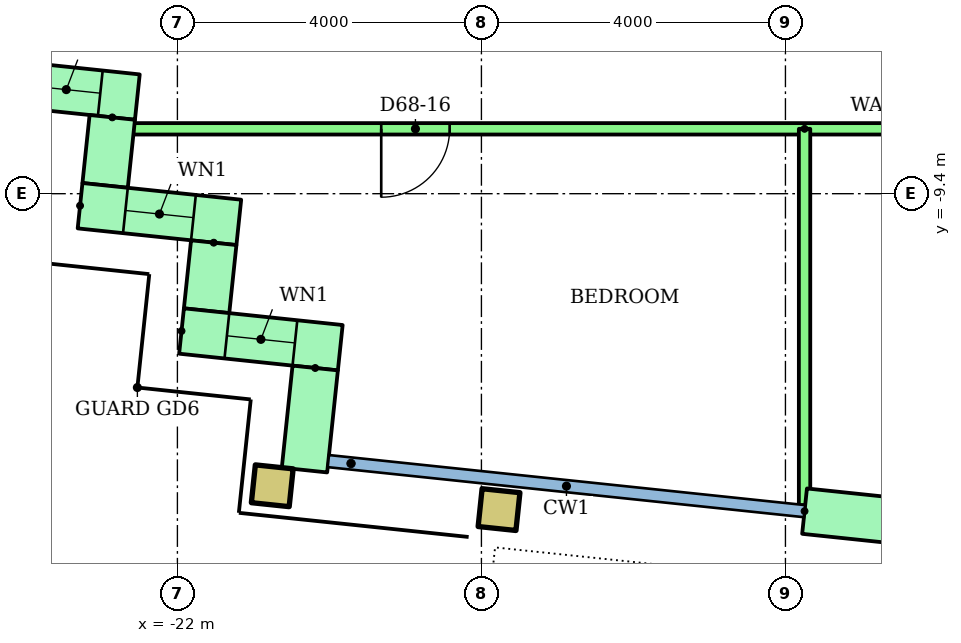
"""IFC4 building model, lengths in metres.
Left out: names, types, materials, properties, quantities, classifications, styles, units other than length and angle.
Written with IfcOpenShell. Run it as: python <this file> out.ifc"""

import sys

from ifc_helpers import new_model, si_unit, direction, frame, frame_2d, origin, origin_2d, place, context, subcontext, project, spatial, rectangle, hollow_rectangle, extrude, element, fill, save


model = new_model("IFC4")
c1 = context("Model", 3, precision=1e-05, world=origin(), true_north=direction((0.0, 1.0)))
c2 = subcontext(c1, "Body", "Model", "MODEL_VIEW")
j1 = project(units=[si_unit("LENGTHUNIT", "METRE"), si_unit("PLANEANGLEUNIT", "RADIAN")], contexts=[c1])
p1 = place(None, origin())
s1 = spatial("IfcSite", under=j1, at=p1, CompositionType="ELEMENT")
p2 = place(p1, origin())
s2 = spatial("IfcBuilding", under=s1, at=p2, CompositionType="ELEMENT")
p3 = place(p2, frame((0.0, 0.0, 262.7)))
s3 = spatial("IfcBuildingStorey", under=s2, at=p3, CompositionType="ELEMENT", Elevation=262.7)
for number, where, z_axis, x_axis in (
    (1, (-20.752, -13.243, 0.0), (0.0, 0.0, 1.0), (0.995, -0.105, 0.0)),
    (2, (-17.768, -13.556, 0.0), (0.0, 0.0, 1.0), (0.995, -0.105, 0.0)),
):
    element("IfcColumn", number, at=place(p3, frame(where, z_axis=z_axis, x_axis=x_axis)), inside=s3, PredefinedType="COLUMN", context=c2, shape_type="SweptSolid", body=[
        extrude(hollow_rectangle(XDim=0.5, YDim=0.5, WallThickness=0.025, at=origin_2d()), origin(), (0.0, 0.0, 1.0), 3.2),
    ])
p4 = place(p3, frame((-24.467, -7.925, 0.0), z_axis=(0.0, 0.0, 1.0), x_axis=(0.994521219184, -0.104534896528, 0.0)))
e3 = element("IfcWall", 3, at=p4, inside=s3, PredefinedType="STANDARD", context=c2, shape_type="SweptSolid", body=[
    extrude(rectangle(XDim=1.95, YDim=0.6, at=frame_2d((0.975, 0.0))), origin(), (0.0, 0.0, 1.0), 2.92),
])
p5 = place(p4, frame((0.56, 0.0, 0.9)))
e4 = element("IfcOpeningElement", 4, at=p5, cuts=e3, PredefinedType="OPENING", context=c2, shape_type="SweptSolid", body=[
    extrude(rectangle(XDim=0.9, YDim=1.5, at=frame_2d((0.45, 0.75))), frame((0.0, 0.31, 0.0), z_axis=(0.0, -1.0, 0.0), x_axis=(1.0, 0.0, 0.0)), (0.0, 0.0, 1.0), 0.62),
])
p6 = place(p3, frame((-22.857, -8.396, 0.0), z_axis=(0.0, 0.0, 1.0), x_axis=(-0.104444712852, -0.994530694326, 0.0)))
e5 = element("IfcWall", 5, at=p6, inside=s3, PredefinedType="STANDARD", context=c2, shape_type="SweptSolid", body=[
    extrude(rectangle(XDim=0.9, YDim=0.6, at=frame_2d((0.45, 0.0))), origin(), (0.0, 0.0, 1.0), 2.92),
])
p7 = place(p3, frame((-23.281, -9.558, 0.0), z_axis=(0.0, 0.0, 1.0), x_axis=(0.994523910136, -0.104509292252, 0.0)))
e6 = element("IfcWall", 6, at=p7, inside=s3, PredefinedType="STANDARD", context=c2, shape_type="SweptSolid", body=[
    extrude(rectangle(XDim=2.1, YDim=0.6, at=frame_2d((1.05, 0.0))), origin(), (0.0, 0.0, 1.0), 2.92),
])
p8 = place(p7, frame((0.6, 0.0, 0.9)))
e7 = element("IfcOpeningElement", 7, at=p8, cuts=e6, PredefinedType="OPENING", context=c2, shape_type="SweptSolid", body=[
    extrude(rectangle(XDim=0.9, YDim=1.5, at=frame_2d((0.45, 0.75))), frame((0.0, 0.31, 0.0), z_axis=(0.0, -1.0, 0.0), x_axis=(1.0, 0.0, 0.0)), (0.0, 0.0, 1.0), 0.62),
])
p9 = place(p3, frame((-21.522, -10.044, 0.0), z_axis=(0.0, 0.0, 1.0), x_axis=(-0.104416541099, -0.994533652495, 0.0)))
e8 = element("IfcWall", 8, at=p9, inside=s3, PredefinedType="STANDARD", context=c2, shape_type="SweptSolid", body=[
    extrude(rectangle(XDim=0.9, YDim=0.6, at=frame_2d((0.45, 0.0))), origin(), (0.0, 0.0, 1.0), 2.92),
])
p10 = place(p3, frame((-21.946, -11.207, 0.0), z_axis=(0.0, 0.0, 1.0), x_axis=(0.994511820899, -0.104624271047, 0.0)))
e9 = element("IfcWall", 9, at=p10, inside=s3, PredefinedType="STANDARD", context=c2, shape_type="SweptSolid", body=[
    extrude(rectangle(XDim=2.1, YDim=0.6, at=frame_2d((1.05, 0.0))), origin(), (0.0, 0.0, 1.0), 2.92),
])
p11 = place(p10, frame((0.6, 0.0, 0.9)))
e10 = element("IfcOpeningElement", 10, at=p11, cuts=e9, PredefinedType="OPENING", context=c2, shape_type="SweptSolid", body=[
    extrude(rectangle(XDim=0.9, YDim=1.5, at=frame_2d((0.45, 0.75))), frame((0.0, 0.31, 0.0), z_axis=(0.0, -1.0, 0.0), x_axis=(1.0, 0.0, 0.0)), (0.0, 0.0, 1.0), 0.62),
])
p12 = place(p3, frame((-20.187, -11.693, 0.0), z_axis=(0.0, 0.0, 1.0), x_axis=(-0.1043365026, -0.994542052517, 0.0)))
e11 = element("IfcWall", 11, at=p12, inside=s3, PredefinedType="STANDARD", context=c2, shape_type="SweptSolid", body=[
    extrude(rectangle(XDim=1.35, YDim=0.6, at=frame_2d((0.675, 0.0))), origin(), (0.0, 0.0, 1.0), 2.92),
])
p13 = place(p3, frame((-13.749, -13.576, 0.0), z_axis=(0.0, 0.0, 1.0), x_axis=(0.994519156568, -0.104554517933, 0.0)))
e12 = element("IfcWall", 12, at=p13, inside=s3, PredefinedType="STANDARD", context=c2, shape_type="SweptSolid", body=[
    extrude(rectangle(XDim=4.0, YDim=0.6, at=frame_2d((2.0, 0.0))), origin(), (0.0, 0.0, 1.0), 2.92),
])
p14 = place(p13, frame((1.4, 0.0, 0.0)))
e13 = element("IfcOpeningElement", 13, at=p14, cuts=e12, PredefinedType="OPENING", context=c2, shape_type="SweptSolid", body=[
    extrude(rectangle(XDim=1.2, YDim=2.1, at=frame_2d((0.6, 1.05))), frame((0.0, 0.31, 0.0), z_axis=(0.0, -1.0, 0.0), x_axis=(1.0, 0.0, 0.0)), (0.0, 0.0, 1.0), 0.62),
])
p15 = place(p3, frame((-1.814, -8.547, 0.0), z_axis=(0.0, 0.0, 1.0), x_axis=(-1.0, 0.0, 0.0)))
e14 = element("IfcWall", 14, at=p15, inside=s3, PredefinedType="PARTITIONING", context=c2, shape_type="SweptSolid", body=[
    extrude(rectangle(XDim=20.767, YDim=0.15, at=frame_2d((10.384, 0.0))), origin(), (0.0, 0.0, 1.0), 2.4),
])
p16 = place(p15, frame((16.604, 0.0, 0.0)))
e15 = element("IfcOpeningElement", 15, at=p16, cuts=e14, PredefinedType="OPENING", context=c2, shape_type="SweptSolid", body=[
    extrude(rectangle(XDim=0.9, YDim=2.1, at=frame_2d((0.45, 1.05))), frame((0.0, 0.085, 0.0), z_axis=(0.0, -1.0, 0.0), x_axis=(1.0, 0.0, 0.0)), (0.0, 0.0, 1.0), 0.17),
])
p17 = place(p15, frame((9.446, 0.0, 0.0)))
e16 = element("IfcOpeningElement", 16, at=p17, cuts=e14, PredefinedType="OPENING", context=c2, shape_type="SweptSolid", body=[
    extrude(rectangle(XDim=1.0, YDim=2.1, at=frame_2d((0.5, 1.05))), frame((0.0, 0.085, 0.0), z_axis=(0.0, -1.0, 0.0), x_axis=(1.0, 0.0, 0.0)), (0.0, 0.0, 1.0), 0.17),
])
p18 = place(p15, frame((5.517, 0.0, 0.0)))
e17 = element("IfcOpeningElement", 17, at=p18, cuts=e14, PredefinedType="OPENING", context=c2, shape_type="SweptSolid", body=[
    extrude(rectangle(XDim=0.9, YDim=2.1, at=frame_2d((0.45, 1.05))), frame((0.0, 0.085, 0.0), z_axis=(0.0, -1.0, 0.0), x_axis=(1.0, 0.0, 0.0)), (0.0, 0.0, 1.0), 0.17),
])
p19 = place(p15, frame((1.539, 0.0, 0.0)))
e18 = element("IfcOpeningElement", 18, at=p19, cuts=e14, PredefinedType="OPENING", context=c2, shape_type="SweptSolid", body=[
    extrude(rectangle(XDim=0.9, YDim=2.1, at=frame_2d((0.45, 1.05))), frame((0.0, 0.085, 0.0), z_axis=(0.0, -1.0, 0.0), x_axis=(1.0, 0.0, 0.0)), (0.0, 0.0, 1.0), 0.17),
])
p20 = place(p3, frame((-13.749, -8.547, 0.0), z_axis=(0.0, 0.0, 1.0), x_axis=(0.0, -1.0, 0.0)))
e19 = element("IfcWall", 19, at=p20, inside=s3, PredefinedType="PARTITIONING", context=c2, shape_type="SweptSolid", body=[
    extrude(rectangle(XDim=4.95, YDim=0.15, at=frame_2d((2.475, 0.0))), origin(), (0.0, 0.0, 1.0), 2.4),
])
p21 = place(p5, origin())
e20 = element("IfcWindow", 20, at=p21, inside=s3, PartitioningType="SINGLE_PANEL", PredefinedType="WINDOW", context=c2, shape_type="SweptSolid", body=[
    extrude(rectangle(XDim=0.9, YDim=1.5, at=frame_2d((0.45, 0.75))), frame((0.0, 0.03, 0.0), z_axis=(0.0, -1.0, 0.0), x_axis=(1.0, 0.0, 0.0)), (0.0, 0.0, 1.0), 0.06),
])
fill(e4, e20)
p22 = place(p8, origin())
e21 = element("IfcWindow", 21, at=p22, inside=s3, PartitioningType="SINGLE_PANEL", PredefinedType="WINDOW", context=c2, shape_type="SweptSolid", body=[
    extrude(rectangle(XDim=0.9, YDim=1.5, at=frame_2d((0.45, 0.75))), frame((0.0, 0.03, 0.0), z_axis=(0.0, -1.0, 0.0), x_axis=(1.0, 0.0, 0.0)), (0.0, 0.0, 1.0), 0.06),
])
fill(e7, e21)
p23 = place(p11, origin())
e22 = element("IfcWindow", 22, at=p23, inside=s3, PartitioningType="SINGLE_PANEL", PredefinedType="WINDOW", context=c2, shape_type="SweptSolid", body=[
    extrude(rectangle(XDim=0.9, YDim=1.5, at=frame_2d((0.45, 0.75))), frame((0.0, 0.03, 0.0), z_axis=(0.0, -1.0, 0.0), x_axis=(1.0, 0.0, 0.0)), (0.0, 0.0, 1.0), 0.06),
])
fill(e10, e22)
p24 = place(p16, origin())
e23 = element("IfcDoor", 23, at=p24, inside=s3, OperationType="SINGLE_SWING_RIGHT", PredefinedType="DOOR", context=c2, shape_type="SweptSolid", body=[
    extrude(rectangle(XDim=0.9, YDim=2.1, at=frame_2d((0.45, 1.05))), frame((0.0, 0.025, 0.0), z_axis=(0.0, -1.0, 0.0), x_axis=(1.0, 0.0, 0.0)), (0.0, 0.0, 1.0), 0.05),
])
fill(e15, e23)
save(model, sys.argv[1])
